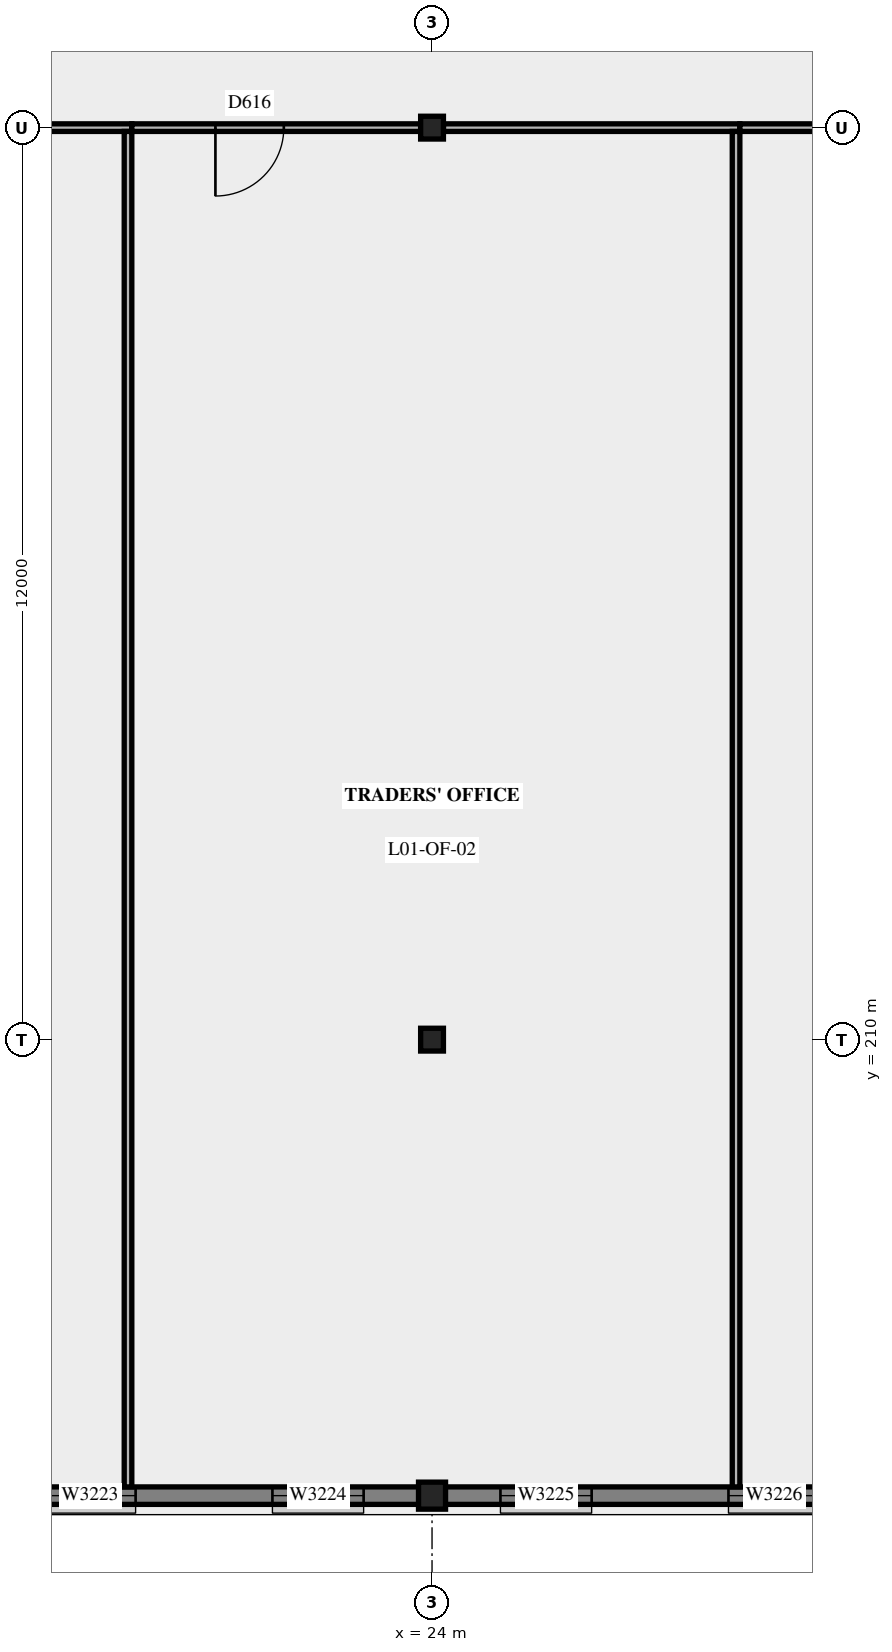
"""IFC4 building model, lengths in metres.
Left out: names, types, materials, properties, quantities, classifications, styles, units other than length and angle.
Written with IfcOpenShell. Run it as: python <this file> out.ifc"""

import sys

from ifc_helpers import new_model, si_unit, direction, frame, frame_2d, origin, origin_2d, place, context, subcontext, project, spatial, rectangle, hollow_circle, i_section, extrude, element, fill, save


model = new_model("IFC4")
c1 = context("Model", 3, precision=1e-05, world=origin(), true_north=direction((0.0, 1.0)))
c2 = subcontext(c1, "Body", "Model", "MODEL_VIEW")
j1 = project(units=[si_unit("LENGTHUNIT", "METRE"), si_unit("PLANEANGLEUNIT", "RADIAN")], contexts=[c1])
p1 = place(None, origin())
s1 = spatial("IfcSite", under=j1, at=p1, CompositionType="ELEMENT")
p2 = place(p1, origin())
s2 = spatial("IfcBuilding", under=s1, at=p2, CompositionType="ELEMENT")
p3 = place(p2, frame((0.0, 0.0, 5.4)))
s3 = spatial("IfcBuildingStorey", under=s2, at=p3, CompositionType="ELEMENT", Elevation=5.4)
for number, where, z_axis, x_axis in (
    (1, (24.0, 210.0, 0.0), (0.0, 0.0, 1.0), (1.0, 0.0, 0.0)),
    (2, (24.0, 222.0, 0.0), (0.0, 0.0, 1.0), (1.0, 0.0, 0.0)),
):
    element("IfcColumn", number, at=place(p3, frame(where, z_axis=z_axis, x_axis=x_axis)), inside=s3, PredefinedType="COLUMN", context=c2, shape_type="SweptSolid", body=[
        extrude(i_section(OverallWidth=0.3, OverallDepth=0.3, WebThickness=0.011, FlangeThickness=0.019, at=origin_2d()), origin(), (0.0, 0.0, 1.0), 5.4),
    ])
p4 = place(p3, frame((24.0, 204.0, 0.0), z_axis=(0.0, 0.0, 1.0), x_axis=(1.0, 0.0, 0.0)))
e3 = element("IfcColumn", 3, at=p4, inside=s3, PredefinedType="COLUMN", context=c2, shape_type="SweptSolid", body=[
    extrude(hollow_circle(Radius=0.178, WallThickness=0.012, at=origin_2d()), origin(), (0.0, 0.0, 1.0), 5.4),
])
p5 = place(p3, frame((12.5, 204.0, 0.0), z_axis=(0.0, 0.0, 1.0), x_axis=(1.0, 0.0, 0.0)))
e4 = element("IfcWall", 4, at=p5, inside=s3, PredefinedType="SOLIDWALL", context=c2, shape_type="SweptSolid", body=[
    extrude(rectangle(XDim=11.35, YDim=0.23, at=frame_2d((5.675, 0.0))), origin(), (0.0, 0.0, 1.0), 4.65),
])
p6 = place(p5, frame((0.4, 0.0, 0.9)))
e5 = element("IfcOpeningElement", 5, at=p6, cuts=e4, PredefinedType="OPENING", context=c2, shape_type="SweptSolid", body=[
    extrude(rectangle(XDim=1.2, YDim=3.3, at=frame_2d((0.6, 1.65))), frame((0.0, 0.125, 0.0), z_axis=(0.0, -1.0, 0.0), x_axis=(1.0, 0.0, 0.0)), (0.0, 0.0, 1.0), 0.25),
])
p7 = place(p5, frame((3.4, 0.0, 0.9)))
e6 = element("IfcOpeningElement", 6, at=p7, cuts=e4, PredefinedType="OPENING", context=c2, shape_type="SweptSolid", body=[
    extrude(rectangle(XDim=1.2, YDim=3.3, at=frame_2d((0.6, 1.65))), frame((0.0, 0.125, 0.0), z_axis=(0.0, -1.0, 0.0), x_axis=(1.0, 0.0, 0.0)), (0.0, 0.0, 1.0), 0.25),
])
p8 = place(p5, frame((6.4, 0.0, 0.9)))
e7 = element("IfcOpeningElement", 7, at=p8, cuts=e4, PredefinedType="OPENING", context=c2, shape_type="SweptSolid", body=[
    extrude(rectangle(XDim=1.2, YDim=3.3, at=frame_2d((0.6, 1.65))), frame((0.0, 0.125, 0.0), z_axis=(0.0, -1.0, 0.0), x_axis=(1.0, 0.0, 0.0)), (0.0, 0.0, 1.0), 0.25),
])
p9 = place(p5, frame((9.4, 0.0, 0.9)))
e8 = element("IfcOpeningElement", 8, at=p9, cuts=e4, PredefinedType="OPENING", context=c2, shape_type="SweptSolid", body=[
    extrude(rectangle(XDim=1.2, YDim=3.3, at=frame_2d((0.6, 1.65))), frame((0.0, 0.125, 0.0), z_axis=(0.0, -1.0, 0.0), x_axis=(1.0, 0.0, 0.0)), (0.0, 0.0, 1.0), 0.25),
])
p10 = place(p3, frame((24.15, 204.0, 0.0), z_axis=(0.0, 0.0, 1.0), x_axis=(1.0, 0.0, 0.0)))
e9 = element("IfcWall", 9, at=p10, inside=s3, PredefinedType="SOLIDWALL", context=c2, shape_type="SweptSolid", body=[
    extrude(rectangle(XDim=11.7, YDim=0.23, at=frame_2d((5.85, 0.0))), origin(), (0.0, 0.0, 1.0), 4.65),
])
p11 = place(p10, frame((0.75, 0.0, 0.9)))
e10 = element("IfcOpeningElement", 10, at=p11, cuts=e9, PredefinedType="OPENING", context=c2, shape_type="SweptSolid", body=[
    extrude(rectangle(XDim=1.2, YDim=3.3, at=frame_2d((0.6, 1.65))), frame((0.0, 0.125, 0.0), z_axis=(0.0, -1.0, 0.0), x_axis=(1.0, 0.0, 0.0)), (0.0, 0.0, 1.0), 0.25),
])
p12 = place(p10, frame((3.75, 0.0, 0.9)))
e11 = element("IfcOpeningElement", 11, at=p12, cuts=e9, PredefinedType="OPENING", context=c2, shape_type="SweptSolid", body=[
    extrude(rectangle(XDim=1.2, YDim=3.3, at=frame_2d((0.6, 1.65))), frame((0.0, 0.125, 0.0), z_axis=(0.0, -1.0, 0.0), x_axis=(1.0, 0.0, 0.0)), (0.0, 0.0, 1.0), 0.25),
])
p13 = place(p10, frame((6.75, 0.0, 0.9)))
e12 = element("IfcOpeningElement", 12, at=p13, cuts=e9, PredefinedType="OPENING", context=c2, shape_type="SweptSolid", body=[
    extrude(rectangle(XDim=1.2, YDim=3.3, at=frame_2d((0.6, 1.65))), frame((0.0, 0.125, 0.0), z_axis=(0.0, -1.0, 0.0), x_axis=(1.0, 0.0, 0.0)), (0.0, 0.0, 1.0), 0.25),
])
p14 = place(p10, frame((9.75, 0.0, 0.9)))
e13 = element("IfcOpeningElement", 13, at=p14, cuts=e9, PredefinedType="OPENING", context=c2, shape_type="SweptSolid", body=[
    extrude(rectangle(XDim=1.2, YDim=3.3, at=frame_2d((0.6, 1.65))), frame((0.0, 0.125, 0.0), z_axis=(0.0, -1.0, 0.0), x_axis=(1.0, 0.0, 0.0)), (0.0, 0.0, 1.0), 0.25),
])
p15 = place(p3, frame((12.15, 222.0, 0.0), z_axis=(0.0, 0.0, 1.0), x_axis=(1.0, 0.0, 0.0)))
e14 = element("IfcWall", 14, at=p15, inside=s3, PredefinedType="PARTITIONING", context=c2, shape_type="SweptSolid", body=[
    extrude(rectangle(XDim=7.9, YDim=0.1, at=frame_2d((3.95, 0.0))), origin(), (0.0, 0.0, 1.0), 4.65),
])
p16 = place(p15, frame((3.4, 0.0, 0.0)))
e15 = element("IfcOpeningElement", 15, at=p16, cuts=e14, PredefinedType="OPENING", context=c2, shape_type="SweptSolid", body=[
    extrude(rectangle(XDim=0.9, YDim=2.1, at=frame_2d((0.45, 1.05))), frame((0.0, 0.06, 0.0), z_axis=(0.0, -1.0, 0.0), x_axis=(1.0, 0.0, 0.0)), (0.0, 0.0, 1.0), 0.12),
])
p17 = place(p3, frame((20.05, 222.0, 0.0), z_axis=(0.0, 0.0, 1.0), x_axis=(1.0, 0.0, 0.0)))
e16 = element("IfcWall", 16, at=p17, inside=s3, PredefinedType="PARTITIONING", context=c2, shape_type="SweptSolid", body=[
    extrude(rectangle(XDim=3.8, YDim=0.1, at=frame_2d((1.9, 0.0))), origin(), (0.0, 0.0, 1.0), 4.65),
])
p18 = place(p17, frame((1.1, 0.0, 0.0)))
e17 = element("IfcOpeningElement", 17, at=p18, cuts=e16, PredefinedType="OPENING", context=c2, shape_type="SweptSolid", body=[
    extrude(rectangle(XDim=0.9, YDim=2.1, at=frame_2d((0.45, 1.05))), frame((0.0, 0.06, 0.0), z_axis=(0.0, -1.0, 0.0), x_axis=(1.0, 0.0, 0.0)), (0.0, 0.0, 1.0), 0.12),
])
p19 = place(p3, frame((24.15, 222.0, 0.0), z_axis=(0.0, 0.0, 1.0), x_axis=(1.0, 0.0, 0.0)))
e18 = element("IfcWall", 18, at=p19, inside=s3, PredefinedType="PARTITIONING", context=c2, shape_type="SweptSolid", body=[
    extrude(rectangle(XDim=3.9, YDim=0.1, at=frame_2d((1.95, 0.0))), origin(), (0.0, 0.0, 1.0), 4.65),
])
p20 = place(p3, frame((28.05, 222.0, 0.0), z_axis=(0.0, 0.0, 1.0), x_axis=(1.0, 0.0, 0.0)))
e19 = element("IfcWall", 19, at=p20, inside=s3, PredefinedType="PARTITIONING", context=c2, shape_type="SweptSolid", body=[
    extrude(rectangle(XDim=7.8, YDim=0.1, at=frame_2d((3.9, 0.0))), origin(), (0.0, 0.0, 1.0), 4.65),
])
p21 = place(p20, frame((3.5, 0.0, 0.0)))
e20 = element("IfcOpeningElement", 20, at=p21, cuts=e19, PredefinedType="OPENING", context=c2, shape_type="SweptSolid", body=[
    extrude(rectangle(XDim=0.9, YDim=2.1, at=frame_2d((0.45, 1.05))), frame((0.0, 0.06, 0.0), z_axis=(0.0, -1.0, 0.0), x_axis=(1.0, 0.0, 0.0)), (0.0, 0.0, 1.0), 0.12),
])
for number, where, z_axis, x_axis in (
    (21, (20.0, 204.115, 0.0), (0.0, 0.0, 1.0), (0.0, 1.0, 0.0)),
    (22, (28.0, 204.115, 0.0), (0.0, 0.0, 1.0), (0.0, 1.0, 0.0)),
):
    element("IfcWall", number, at=place(p3, frame(where, z_axis=z_axis, x_axis=x_axis)), inside=s3, PredefinedType="PARTITIONING", context=c2, shape_type="SweptSolid", body=[
        extrude(rectangle(XDim=17.835, YDim=0.1, at=frame_2d((8.917, 0.0))), origin(), (0.0, 0.0, 1.0), 4.65),
    ])
p22 = place(p8, origin())
e23 = element("IfcWindow", 23, at=p22, inside=s3, PartitioningType="SINGLE_PANEL", PredefinedType="WINDOW", context=c2, shape_type="SweptSolid", body=[
    extrude(rectangle(XDim=1.2, YDim=3.3, at=frame_2d((0.6, 1.65))), frame((0.0, 0.03, 0.0), z_axis=(0.0, -1.0, 0.0), x_axis=(1.0, 0.0, 0.0)), (0.0, 0.0, 1.0), 0.06),
])
fill(e7, e23)
p23 = place(p9, origin())
e24 = element("IfcWindow", 24, at=p23, inside=s3, PartitioningType="SINGLE_PANEL", PredefinedType="WINDOW", context=c2, shape_type="SweptSolid", body=[
    extrude(rectangle(XDim=1.2, YDim=3.3, at=frame_2d((0.6, 1.65))), frame((0.0, 0.03, 0.0), z_axis=(0.0, -1.0, 0.0), x_axis=(1.0, 0.0, 0.0)), (0.0, 0.0, 1.0), 0.06),
])
fill(e8, e24)
p24 = place(p11, origin())
e25 = element("IfcWindow", 25, at=p24, inside=s3, PartitioningType="SINGLE_PANEL", PredefinedType="WINDOW", context=c2, shape_type="SweptSolid", body=[
    extrude(rectangle(XDim=1.2, YDim=3.3, at=frame_2d((0.6, 1.65))), frame((0.0, 0.03, 0.0), z_axis=(0.0, -1.0, 0.0), x_axis=(1.0, 0.0, 0.0)), (0.0, 0.0, 1.0), 0.06),
])
fill(e10, e25)
p25 = place(p12, origin())
e26 = element("IfcWindow", 26, at=p25, inside=s3, PartitioningType="SINGLE_PANEL", PredefinedType="WINDOW", context=c2, shape_type="SweptSolid", body=[
    extrude(rectangle(XDim=1.2, YDim=3.3, at=frame_2d((0.6, 1.65))), frame((0.0, 0.03, 0.0), z_axis=(0.0, -1.0, 0.0), x_axis=(1.0, 0.0, 0.0)), (0.0, 0.0, 1.0), 0.06),
])
fill(e11, e26)
p26 = place(p18, origin())
e27 = element("IfcDoor", 27, at=p26, inside=s3, OperationType="SINGLE_SWING_RIGHT", PredefinedType="DOOR", context=c2, shape_type="SweptSolid", body=[
    extrude(rectangle(XDim=0.9, YDim=2.1, at=frame_2d((0.45, 1.05))), frame((0.0, 0.025, 0.0), z_axis=(0.0, -1.0, 0.0), x_axis=(1.0, 0.0, 0.0)), (0.0, 0.0, 1.0), 0.05),
])
fill(e17, e27)
save(model, sys.argv[1])
